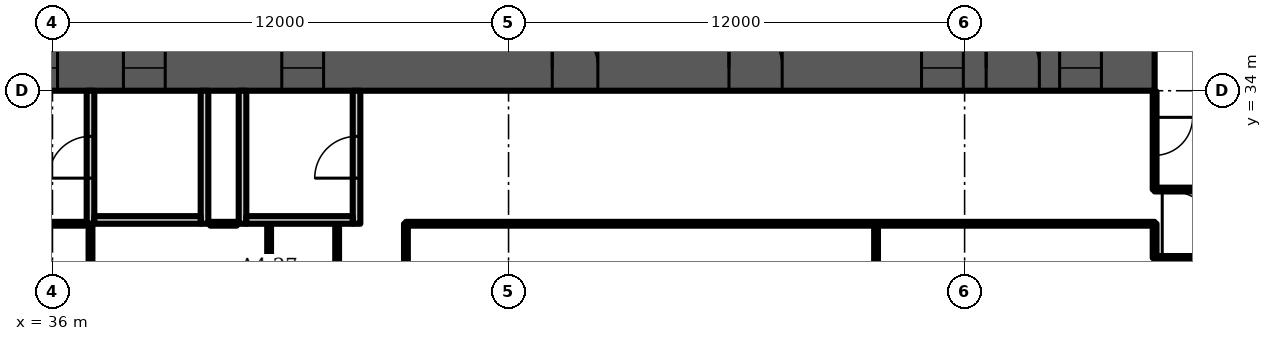
"""IFC4 building model, lengths in metres.
Left out: names, types, materials, properties, quantities, classifications, styles, units other than length and angle.
Written with IfcOpenShell. Run it as: python <this file> out.ifc"""

import sys

from ifc_helpers import new_model, si_unit, direction, frame, frame_2d, origin, place, context, subcontext, project, spatial, rectangle, extrude, element, fill, save


model = new_model("IFC4")
c1 = context("Model", 3, precision=1e-05, world=origin(), true_north=direction((0.0, 1.0)))
c2 = subcontext(c1, "Body", "Model", "MODEL_VIEW")
j1 = project(units=[si_unit("LENGTHUNIT", "METRE"), si_unit("PLANEANGLEUNIT", "RADIAN")], contexts=[c1])
p1 = place(None, origin())
s1 = spatial("IfcSite", under=j1, at=p1, CompositionType="ELEMENT")
p2 = place(p1, origin())
s2 = spatial("IfcBuilding", under=s1, at=p2, CompositionType="ELEMENT")
p3 = place(p2, frame((0.0, 0.0, 73.9)))
s3 = spatial("IfcBuildingStorey", under=s2, at=p3, CompositionType="ELEMENT", Elevation=73.9)
p4 = place(p3, frame((9.0, 34.6, 0.0), z_axis=(0.0, 0.0, 1.0), x_axis=(1.0, 0.0, 0.0)))
e1 = element("IfcWall", 1, at=p4, inside=s3, PredefinedType="SHEAR", context=c2, shape_type="SweptSolid", body=[
    extrude(rectangle(XDim=56.0, YDim=1.2, at=frame_2d((28.0, 0.0))), origin(), (0.0, 0.0, 1.0), 3.6),
])
p5 = place(p4, frame((2.0, 0.0, 0.0)))
e2 = element("IfcOpeningElement", 2, at=p5, cuts=e1, PredefinedType="OPENING", context=c2, shape_type="SweptSolid", body=[
    extrude(rectangle(XDim=1.0, YDim=2.1, at=frame_2d((0.5, 1.05))), frame((0.0, 0.61, 0.0), z_axis=(0.0, -1.0, 0.0), x_axis=(1.0, 0.0, 0.0)), (0.0, 0.0, 1.0), 1.22),
])
p6 = place(p4, frame((4.6, 0.0, 0.0)))
e3 = element("IfcOpeningElement", 3, at=p6, cuts=e1, PredefinedType="OPENING", context=c2, shape_type="SweptSolid", body=[
    extrude(rectangle(XDim=1.0, YDim=2.1, at=frame_2d((0.5, 1.05))), frame((0.0, 0.61, 0.0), z_axis=(0.0, -1.0, 0.0), x_axis=(1.0, 0.0, 0.0)), (0.0, 0.0, 1.0), 1.22),
])
p7 = place(p4, frame((7.867, 0.0, 0.0)))
e4 = element("IfcOpeningElement", 4, at=p7, cuts=e1, PredefinedType="OPENING", context=c2, shape_type="SweptSolid", body=[
    extrude(rectangle(XDim=1.1, YDim=2.1, at=frame_2d((0.55, 1.05))), frame((0.0, 0.61, 0.0), z_axis=(0.0, -1.0, 0.0), x_axis=(1.0, 0.0, 0.0)), (0.0, 0.0, 1.0), 1.22),
])
p8 = place(p4, frame((12.033, 0.0, 0.0)))
e5 = element("IfcOpeningElement", 5, at=p8, cuts=e1, PredefinedType="OPENING", context=c2, shape_type="SweptSolid", body=[
    extrude(rectangle(XDim=1.1, YDim=2.1, at=frame_2d((0.55, 1.05))), frame((0.0, 0.61, 0.0), z_axis=(0.0, -1.0, 0.0), x_axis=(1.0, 0.0, 0.0)), (0.0, 0.0, 1.0), 1.22),
])
p9 = place(p4, frame((9.8, 0.0, 0.0)))
e6 = element("IfcOpeningElement", 6, at=p9, cuts=e1, PredefinedType="OPENING", context=c2, shape_type="SweptSolid", body=[
    extrude(rectangle(XDim=1.4, YDim=2.1, at=frame_2d((0.7, 1.05))), frame((0.0, 0.61, 0.0), z_axis=(0.0, -1.0, 0.0), x_axis=(1.0, 0.0, 0.0)), (0.0, 0.0, 1.0), 1.22),
])
p10 = place(p4, frame((14.65, 0.0, 0.0)))
e7 = element("IfcOpeningElement", 7, at=p10, cuts=e1, PredefinedType="OPENING", context=c2, shape_type="SweptSolid", body=[
    extrude(rectangle(XDim=1.2, YDim=2.1, at=frame_2d((0.6, 1.05))), frame((0.0, 0.61, 0.0), z_axis=(0.0, -1.0, 0.0), x_axis=(1.0, 0.0, 0.0)), (0.0, 0.0, 1.0), 1.22),
])
p11 = place(p4, frame((21.867, 0.0, 0.0)))
e8 = element("IfcOpeningElement", 8, at=p11, cuts=e1, PredefinedType="OPENING", context=c2, shape_type="SweptSolid", body=[
    extrude(rectangle(XDim=1.1, YDim=2.1, at=frame_2d((0.55, 1.05))), frame((0.0, 0.61, 0.0), z_axis=(0.0, -1.0, 0.0), x_axis=(1.0, 0.0, 0.0)), (0.0, 0.0, 1.0), 1.22),
])
p12 = place(p4, frame((26.033, 0.0, 0.0)))
e9 = element("IfcOpeningElement", 9, at=p12, cuts=e1, PredefinedType="OPENING", context=c2, shape_type="SweptSolid", body=[
    extrude(rectangle(XDim=1.1, YDim=2.1, at=frame_2d((0.55, 1.05))), frame((0.0, 0.61, 0.0), z_axis=(0.0, -1.0, 0.0), x_axis=(1.0, 0.0, 0.0)), (0.0, 0.0, 1.0), 1.22),
])
p13 = place(p4, frame((23.8, 0.0, 0.0)))
e10 = element("IfcOpeningElement", 10, at=p13, cuts=e1, PredefinedType="OPENING", context=c2, shape_type="SweptSolid", body=[
    extrude(rectangle(XDim=1.4, YDim=2.1, at=frame_2d((0.7, 1.05))), frame((0.0, 0.61, 0.0), z_axis=(0.0, -1.0, 0.0), x_axis=(1.0, 0.0, 0.0)), (0.0, 0.0, 1.0), 1.22),
])
p14 = place(p4, frame((28.867, 0.0, 0.0)))
e11 = element("IfcOpeningElement", 11, at=p14, cuts=e1, PredefinedType="OPENING", context=c2, shape_type="SweptSolid", body=[
    extrude(rectangle(XDim=1.1, YDim=2.1, at=frame_2d((0.55, 1.05))), frame((0.0, 0.61, 0.0), z_axis=(0.0, -1.0, 0.0), x_axis=(1.0, 0.0, 0.0)), (0.0, 0.0, 1.0), 1.22),
])
p15 = place(p4, frame((33.033, 0.0, 0.0)))
e12 = element("IfcOpeningElement", 12, at=p15, cuts=e1, PredefinedType="OPENING", context=c2, shape_type="SweptSolid", body=[
    extrude(rectangle(XDim=1.1, YDim=2.1, at=frame_2d((0.55, 1.05))), frame((0.0, 0.61, 0.0), z_axis=(0.0, -1.0, 0.0), x_axis=(1.0, 0.0, 0.0)), (0.0, 0.0, 1.0), 1.22),
])
p16 = place(p4, frame((40.15, 0.0, 0.0)))
e13 = element("IfcOpeningElement", 13, at=p16, cuts=e1, PredefinedType="OPENING", context=c2, shape_type="SweptSolid", body=[
    extrude(rectangle(XDim=1.2, YDim=2.1, at=frame_2d((0.6, 1.05))), frame((0.0, 0.61, 0.0), z_axis=(0.0, -1.0, 0.0), x_axis=(1.0, 0.0, 0.0)), (0.0, 0.0, 1.0), 1.22),
])
p17 = place(p4, frame((44.8, 0.0, 0.0)))
e14 = element("IfcOpeningElement", 14, at=p17, cuts=e1, PredefinedType="OPENING", context=c2, shape_type="SweptSolid", body=[
    extrude(rectangle(XDim=1.4, YDim=2.1, at=frame_2d((0.7, 1.05))), frame((0.0, 0.61, 0.0), z_axis=(0.0, -1.0, 0.0), x_axis=(1.0, 0.0, 0.0)), (0.0, 0.0, 1.0), 1.22),
])
p18 = place(p4, frame((49.867, 0.0, 0.0)))
e15 = element("IfcOpeningElement", 15, at=p18, cuts=e1, PredefinedType="OPENING", context=c2, shape_type="SweptSolid", body=[
    extrude(rectangle(XDim=1.1, YDim=2.1, at=frame_2d((0.55, 1.05))), frame((0.0, 0.61, 0.0), z_axis=(0.0, -1.0, 0.0), x_axis=(1.0, 0.0, 0.0)), (0.0, 0.0, 1.0), 1.22),
])
p19 = place(p4, frame((53.5, 0.0, 0.0)))
e16 = element("IfcOpeningElement", 16, at=p19, cuts=e1, PredefinedType="OPENING", context=c2, shape_type="SweptSolid", body=[
    extrude(rectangle(XDim=1.1, YDim=2.1, at=frame_2d((0.55, 1.05))), frame((0.0, 0.61, 0.0), z_axis=(0.0, -1.0, 0.0), x_axis=(1.0, 0.0, 0.0)), (0.0, 0.0, 1.0), 1.22),
])
p20 = place(p4, frame((51.567, 0.0, 0.0)))
e17 = element("IfcOpeningElement", 17, at=p20, cuts=e1, PredefinedType="OPENING", context=c2, shape_type="SweptSolid", body=[
    extrude(rectangle(XDim=1.4, YDim=2.1, at=frame_2d((0.7, 1.05))), frame((0.0, 0.61, 0.0), z_axis=(0.0, -1.0, 0.0), x_axis=(1.0, 0.0, 0.0)), (0.0, 0.0, 1.0), 1.22),
])
p21 = place(p3, frame((37.0, 30.5, 0.0), z_axis=(0.0, 0.0, 1.0), x_axis=(0.0, 1.0, 0.0)))
e18 = element("IfcWall", 18, at=p21, inside=s3, PredefinedType="PARTITIONING", context=c2, shape_type="SweptSolid", body=[
    extrude(rectangle(XDim=3.5, YDim=0.2, at=frame_2d((1.75, 0.0))), origin(), (0.0, 0.0, 1.0), 3.2),
])
p22 = place(p21, frame((1.2, 0.0, 0.0)))
e19 = element("IfcOpeningElement", 19, at=p22, cuts=e18, PredefinedType="OPENING", context=c2, shape_type="SweptSolid", body=[
    extrude(rectangle(XDim=1.1, YDim=2.1, at=frame_2d((0.55, 1.05))), frame((0.0, 0.11, 0.0), z_axis=(0.0, -1.0, 0.0), x_axis=(1.0, 0.0, 0.0)), (0.0, 0.0, 1.0), 0.22),
])
p23 = place(p3, frame((40.0, 30.5, 0.0), z_axis=(0.0, 0.0, 1.0), x_axis=(0.0, 1.0, 0.0)))
e20 = element("IfcWall", 20, at=p23, inside=s3, PredefinedType="PARTITIONING", context=c2, shape_type="SweptSolid", body=[
    extrude(rectangle(XDim=3.5, YDim=0.2, at=frame_2d((1.75, 0.0))), origin(), (0.0, 0.0, 1.0), 3.2),
])
p24 = place(p3, frame((37.1, 30.6, 0.0), z_axis=(0.0, 0.0, 1.0), x_axis=(1.0, 0.0, 0.0)))
e21 = element("IfcWall", 21, at=p24, inside=s3, PredefinedType="PARTITIONING", context=c2, shape_type="SweptSolid", body=[
    extrude(rectangle(XDim=2.8, YDim=0.2, at=frame_2d((1.4, 0.0))), origin(), (0.0, 0.0, 1.0), 3.2),
])
p25 = place(p3, frame((41.0, 30.5, 0.0), z_axis=(0.0, 0.0, 1.0), x_axis=(0.0, 1.0, 0.0)))
e22 = element("IfcWall", 22, at=p25, inside=s3, PredefinedType="PARTITIONING", context=c2, shape_type="SweptSolid", body=[
    extrude(rectangle(XDim=3.5, YDim=0.2, at=frame_2d((1.75, 0.0))), origin(), (0.0, 0.0, 1.0), 3.2),
])
p26 = place(p3, frame((44.0, 30.5, 0.0), z_axis=(0.0, 0.0, 1.0), x_axis=(0.0, 1.0, 0.0)))
e23 = element("IfcWall", 23, at=p26, inside=s3, PredefinedType="PARTITIONING", context=c2, shape_type="SweptSolid", body=[
    extrude(rectangle(XDim=3.5, YDim=0.2, at=frame_2d((1.75, 0.0))), origin(), (0.0, 0.0, 1.0), 3.2),
])
p27 = place(p26, frame((1.2, 0.0, 0.0)))
e24 = element("IfcOpeningElement", 24, at=p27, cuts=e23, PredefinedType="OPENING", context=c2, shape_type="SweptSolid", body=[
    extrude(rectangle(XDim=1.1, YDim=2.1, at=frame_2d((0.55, 1.05))), frame((0.0, 0.11, 0.0), z_axis=(0.0, -1.0, 0.0), x_axis=(1.0, 0.0, 0.0)), (0.0, 0.0, 1.0), 0.22),
])
p28 = place(p3, frame((41.1, 30.6, 0.0), z_axis=(0.0, 0.0, 1.0), x_axis=(1.0, 0.0, 0.0)))
e25 = element("IfcWall", 25, at=p28, inside=s3, PredefinedType="PARTITIONING", context=c2, shape_type="SweptSolid", body=[
    extrude(rectangle(XDim=2.8, YDim=0.2, at=frame_2d((1.4, 0.0))), origin(), (0.0, 0.0, 1.0), 3.2),
])
p29 = place(p3, frame((21.94, 30.5, 0.0), z_axis=(0.0, 0.0, 1.0), x_axis=(1.0, 0.0, 0.0)))
e26 = element("IfcWall", 26, at=p29, inside=s3, PredefinedType="PARTITIONING", context=c2, shape_type="SweptSolid", body=[
    extrude(rectangle(XDim=14.91, YDim=0.1, at=frame_2d((7.455, 0.0))), origin(), (0.0, 0.0, 1.0), 3.2),
])
p30 = place(p29, frame((0.345, 0.0, 0.0)))
e27 = element("IfcOpeningElement", 27, at=p30, cuts=e26, PredefinedType="OPENING", context=c2, shape_type="SweptSolid", body=[
    extrude(rectangle(XDim=1.0, YDim=2.1, at=frame_2d((0.5, 1.05))), frame((0.0, 0.06, 0.0), z_axis=(0.0, -1.0, 0.0), x_axis=(1.0, 0.0, 0.0)), (0.0, 0.0, 1.0), 0.12),
])
p31 = place(p29, frame((8.95, 0.0, 0.0)))
e28 = element("IfcOpeningElement", 28, at=p31, cuts=e26, PredefinedType="OPENING", context=c2, shape_type="SweptSolid", body=[
    extrude(rectangle(XDim=1.8, YDim=2.1, at=frame_2d((0.9, 1.05))), frame((0.0, 0.06, 0.0), z_axis=(0.0, -1.0, 0.0), x_axis=(1.0, 0.0, 0.0)), (0.0, 0.0, 1.0), 0.12),
])
p32 = place(p3, frame((37.0, 13.24, 0.0), z_axis=(0.0, 0.0, 1.0), x_axis=(0.0, 1.0, 0.0)))
e29 = element("IfcWall", 29, at=p32, inside=s3, PredefinedType="PARTITIONING", context=c2, shape_type="SweptSolid", body=[
    extrude(rectangle(XDim=17.26, YDim=0.1, at=frame_2d((8.63, 0.0))), origin(), (0.0, 0.0, 1.0), 3.2),
])
p33 = place(p3, frame((41.7, 13.24, 0.0), z_axis=(0.0, 0.0, 1.0), x_axis=(0.0, 1.0, 0.0)))
e30 = element("IfcWall", 30, at=p33, inside=s3, PredefinedType="PARTITIONING", context=c2, shape_type="SweptSolid", body=[
    extrude(rectangle(XDim=17.25, YDim=0.1, at=frame_2d((8.625, 0.0))), origin(), (0.0, 0.0, 1.0), 3.2),
])
p34 = place(p33, frame((3.046, 0.0, 0.0)))
e31 = element("IfcOpeningElement", 31, at=p34, cuts=e30, PredefinedType="OPENING", context=c2, shape_type="SweptSolid", body=[
    extrude(rectangle(XDim=0.9, YDim=2.1, at=frame_2d((0.45, 1.05))), frame((0.0, 0.06, 0.0), z_axis=(0.0, -1.0, 0.0), x_axis=(1.0, 0.0, 0.0)), (0.0, 0.0, 1.0), 0.12),
])
p35 = place(p33, frame((9.465, 0.0, 0.0)))
e32 = element("IfcOpeningElement", 32, at=p35, cuts=e30, PredefinedType="OPENING", context=c2, shape_type="SweptSolid", body=[
    extrude(rectangle(XDim=0.9, YDim=2.1, at=frame_2d((0.45, 1.05))), frame((0.0, 0.06, 0.0), z_axis=(0.0, -1.0, 0.0), x_axis=(1.0, 0.0, 0.0)), (0.0, 0.0, 1.0), 0.12),
])
p36 = place(p33, frame((14.64, 0.0, 0.0)))
e33 = element("IfcOpeningElement", 33, at=p36, cuts=e30, PredefinedType="OPENING", context=c2, shape_type="SweptSolid", body=[
    extrude(rectangle(XDim=1.0, YDim=2.1, at=frame_2d((0.5, 1.05))), frame((0.0, 0.06, 0.0), z_axis=(0.0, -1.0, 0.0), x_axis=(1.0, 0.0, 0.0)), (0.0, 0.0, 1.0), 0.12),
])
p37 = place(p3, frame((43.49, 13.24, 0.0), z_axis=(0.0, 0.0, 1.0), x_axis=(0.0, 1.0, 0.0)))
e34 = element("IfcWall", 34, at=p37, inside=s3, PredefinedType="PARTITIONING", context=c2, shape_type="SweptSolid", body=[
    extrude(rectangle(XDim=17.25, YDim=0.1, at=frame_2d((8.625, 0.0))), origin(), (0.0, 0.0, 1.0), 3.2),
])
p38 = place(p37, frame((8.139, 0.0, 0.0)))
e35 = element("IfcOpeningElement", 35, at=p38, cuts=e34, PredefinedType="OPENING", context=c2, shape_type="SweptSolid", body=[
    extrude(rectangle(XDim=1.0, YDim=2.1, at=frame_2d((0.5, 1.05))), frame((0.0, 0.06, 0.0), z_axis=(0.0, -1.0, 0.0), x_axis=(1.0, 0.0, 0.0)), (0.0, 0.0, 1.0), 0.12),
])
p39 = place(p3, frame((45.3, -3.943, 0.0), z_axis=(0.0, 0.0, 1.0), x_axis=(0.0, 1.0, 0.0)))
e36 = element("IfcWall", 36, at=p39, inside=s3, PredefinedType="PARTITIONING", context=c2, shape_type="SweptSolid", body=[
    extrude(rectangle(XDim=34.443, YDim=0.1, at=frame_2d((17.222, 0.0))), origin(), (0.0, 0.0, 1.0), 2.58),
])
p40 = place(p39, frame((1.598, 0.0, 0.0)))
e37 = element("IfcOpeningElement", 37, at=p40, cuts=e36, PredefinedType="OPENING", context=c2, shape_type="SweptSolid", body=[
    extrude(rectangle(XDim=1.0, YDim=2.1, at=frame_2d((0.5, 1.05))), frame((0.0, 0.06, 0.0), z_axis=(0.0, -1.0, 0.0), x_axis=(1.0, 0.0, 0.0)), (0.0, 0.0, 1.0), 0.12),
])
p41 = place(p39, frame((5.853, 0.0, 0.0)))
e38 = element("IfcOpeningElement", 38, at=p41, cuts=e36, PredefinedType="OPENING", context=c2, shape_type="SweptSolid", body=[
    extrude(rectangle(XDim=1.0, YDim=2.1, at=frame_2d((0.5, 1.05))), frame((0.0, 0.06, 0.0), z_axis=(0.0, -1.0, 0.0), x_axis=(1.0, 0.0, 0.0)), (0.0, 0.0, 1.0), 0.12),
])
p42 = place(p39, frame((10.173, 0.0, 0.0)))
e39 = element("IfcOpeningElement", 39, at=p42, cuts=e36, PredefinedType="OPENING", context=c2, shape_type="SweptSolid", body=[
    extrude(rectangle(XDim=1.0, YDim=2.1, at=frame_2d((0.5, 1.05))), frame((0.0, 0.06, 0.0), z_axis=(0.0, -1.0, 0.0), x_axis=(1.0, 0.0, 0.0)), (0.0, 0.0, 1.0), 0.12),
])
p43 = place(p39, frame((14.488, 0.0, 0.0)))
e40 = element("IfcOpeningElement", 40, at=p43, cuts=e36, PredefinedType="OPENING", context=c2, shape_type="SweptSolid", body=[
    extrude(rectangle(XDim=1.0, YDim=2.1, at=frame_2d((0.5, 1.05))), frame((0.0, 0.06, 0.0), z_axis=(0.0, -1.0, 0.0), x_axis=(1.0, 0.0, 0.0)), (0.0, 0.0, 1.0), 0.12),
])
p44 = place(p39, frame((31.403, 0.0, 0.0)))
e41 = element("IfcOpeningElement", 41, at=p44, cuts=e36, PredefinedType="OPENING", context=c2, shape_type="SweptSolid", body=[
    extrude(rectangle(XDim=1.0, YDim=2.1, at=frame_2d((0.5, 1.05))), frame((0.0, 0.06, 0.0), z_axis=(0.0, -1.0, 0.0), x_axis=(1.0, 0.0, 0.0)), (0.0, 0.0, 1.0), 0.12),
])
p45 = place(p3, frame((45.3, 30.5, 0.0), z_axis=(0.0, 0.0, 1.0), x_axis=(1.0, 0.0, 0.0)))
e42 = element("IfcWall", 42, at=p45, inside=s3, PredefinedType="PARTITIONING", context=c2, shape_type="SweptSolid", body=[
    extrude(rectangle(XDim=19.7, YDim=0.1, at=frame_2d((9.85, 0.0))), origin(), (0.0, 0.0, 1.0), 3.2),
])
p46 = place(p3, frame((57.67, 13.24, 0.0), z_axis=(0.0, 0.0, 1.0), x_axis=(0.0, 1.0, 0.0)))
e43 = element("IfcWall", 43, at=p46, inside=s3, PredefinedType="PARTITIONING", context=c2, shape_type="SweptSolid", body=[
    extrude(rectangle(XDim=17.26, YDim=0.1, at=frame_2d((8.63, 0.0))), origin(), (0.0, 0.0, 1.0), 3.2),
])
p47 = place(p3, frame((65.0, 29.6, 0.0), z_axis=(0.0, 0.0, 1.0), x_axis=(0.0, 1.0, 0.0)))
e44 = element("IfcWall", 44, at=p47, inside=s3, PredefinedType="PARTITIONING", context=c2, shape_type="SweptSolid", body=[
    extrude(rectangle(XDim=0.9, YDim=0.1, at=frame_2d((0.45, 0.0))), origin(), (0.0, 0.0, 1.0), 3.2),
])
p48 = place(p3, frame((65.0, 29.6, 0.0), z_axis=(0.0, 0.0, 1.0), x_axis=(1.0, 0.0, 0.0)))
e45 = element("IfcWall", 45, at=p48, inside=s3, PredefinedType="PARTITIONING", context=c2, shape_type="SweptSolid", body=[
    extrude(rectangle(XDim=4.425, YDim=0.1, at=frame_2d((2.212, 0.0))), origin(), (0.0, 0.0, 1.0), 3.2),
])
p49 = place(p48, frame((0.2, 0.0, 0.0)))
e46 = element("IfcOpeningElement", 46, at=p49, cuts=e45, PredefinedType="OPENING", context=c2, shape_type="SweptSolid", body=[
    extrude(rectangle(XDim=1.8, YDim=2.1, at=frame_2d((0.9, 1.05))), frame((0.0, 0.06, 0.0), z_axis=(0.0, -1.0, 0.0), x_axis=(1.0, 0.0, 0.0)), (0.0, 0.0, 1.0), 0.12),
])
p50 = place(p3, frame((65.0, 31.4, 0.0), z_axis=(0.0, 0.0, 1.0), x_axis=(0.0, 1.0, 0.0)))
e47 = element("IfcWall", 47, at=p50, inside=s3, PredefinedType="PARTITIONING", context=c2, shape_type="SweptSolid", body=[
    extrude(rectangle(XDim=2.58, YDim=0.1, at=frame_2d((1.29, 0.0))), origin(), (0.0, 0.0, 1.0), 3.2),
])
p51 = place(p50, frame((0.9, 0.0, 0.0)))
e48 = element("IfcOpeningElement", 48, at=p51, cuts=e47, PredefinedType="OPENING", context=c2, shape_type="SweptSolid", body=[
    extrude(rectangle(XDim=1.0, YDim=2.1, at=frame_2d((0.5, 1.05))), frame((0.0, 0.06, 0.0), z_axis=(0.0, -1.0, 0.0), x_axis=(1.0, 0.0, 0.0)), (0.0, 0.0, 1.0), 0.12),
])
p52 = place(p3, frame((65.0, 31.4, 0.0), z_axis=(0.0, 0.0, 1.0), x_axis=(1.0, 0.0, 0.0)))
e49 = element("IfcWall", 49, at=p52, inside=s3, PredefinedType="PARTITIONING", context=c2, shape_type="SweptSolid", body=[
    extrude(rectangle(XDim=7.81, YDim=0.1, at=frame_2d((3.905, 0.0))), origin(), (0.0, 0.0, 1.0), 3.2),
])
p53 = place(p52, frame((6.657, 0.0, 0.0)))
e50 = element("IfcOpeningElement", 50, at=p53, cuts=e49, PredefinedType="OPENING", context=c2, shape_type="SweptSolid", body=[
    extrude(rectangle(XDim=1.0, YDim=2.1, at=frame_2d((0.5, 1.05))), frame((0.0, 0.06, 0.0), z_axis=(0.0, -1.0, 0.0), x_axis=(1.0, 0.0, 0.0)), (0.0, 0.0, 1.0), 0.12),
])
p54 = place(p3, frame((40.15, 30.5, 0.0), z_axis=(0.0, 0.0, 1.0), x_axis=(1.0, 0.0, 0.0)))
e51 = element("IfcWall", 51, at=p54, inside=s3, PredefinedType="PARTITIONING", context=c2, shape_type="SweptSolid", body=[
    extrude(rectangle(XDim=0.7, YDim=0.1, at=frame_2d((0.35, 0.0))), origin(), (0.0, 0.0, 1.0), 3.2),
])
p55 = place(p12, origin())
e52 = element("IfcDoor", 52, at=p55, inside=s3, OperationType="DOUBLE_DOOR_SLIDING", PredefinedType="DOOR", context=c2, shape_type="SweptSolid", body=[
    extrude(rectangle(XDim=1.1, YDim=2.1, at=frame_2d((0.55, 1.05))), frame((0.0, 0.025, 0.0), z_axis=(0.0, -1.0, 0.0), x_axis=(1.0, 0.0, 0.0)), (0.0, 0.0, 1.0), 0.05),
])
fill(e9, e52)
p56 = place(p14, origin())
e53 = element("IfcDoor", 53, at=p56, inside=s3, OperationType="DOUBLE_DOOR_SLIDING", PredefinedType="DOOR", context=c2, shape_type="SweptSolid", body=[
    extrude(rectangle(XDim=1.1, YDim=2.1, at=frame_2d((0.55, 1.05))), frame((0.0, 0.025, 0.0), z_axis=(0.0, -1.0, 0.0), x_axis=(1.0, 0.0, 0.0)), (0.0, 0.0, 1.0), 0.05),
])
fill(e11, e53)
p57 = place(p15, origin())
e54 = element("IfcDoor", 54, at=p57, inside=s3, OperationType="DOUBLE_DOOR_SLIDING", PredefinedType="DOOR", context=c2, shape_type="SweptSolid", body=[
    extrude(rectangle(XDim=1.1, YDim=2.1, at=frame_2d((0.55, 1.05))), frame((0.0, 0.025, 0.0), z_axis=(0.0, -1.0, 0.0), x_axis=(1.0, 0.0, 0.0)), (0.0, 0.0, 1.0), 0.05),
])
fill(e12, e54)
p58 = place(p16, origin())
e55 = element("IfcDoor", 55, at=p58, inside=s3, OperationType="SINGLE_SWING_LEFT", PredefinedType="DOOR", context=c2, shape_type="SweptSolid", body=[
    extrude(rectangle(XDim=1.2, YDim=2.1, at=frame_2d((0.6, 1.05))), frame((0.0, 0.025, 0.0), z_axis=(0.0, -1.0, 0.0), x_axis=(1.0, 0.0, 0.0)), (0.0, 0.0, 1.0), 0.05),
])
fill(e13, e55)
p59 = place(p17, origin())
e56 = element("IfcDoor", 56, at=p59, inside=s3, OperationType="DOUBLE_DOOR_SINGLE_SWING", PredefinedType="DOOR", context=c2, shape_type="SweptSolid", body=[
    extrude(rectangle(XDim=1.4, YDim=2.1, at=frame_2d((0.7, 1.05))), frame((0.0, 0.025, 0.0), z_axis=(0.0, -1.0, 0.0), x_axis=(1.0, 0.0, 0.0)), (0.0, 0.0, 1.0), 0.05),
])
fill(e14, e56)
p60 = place(p18, origin())
e57 = element("IfcDoor", 57, at=p60, inside=s3, OperationType="DOUBLE_DOOR_SLIDING", PredefinedType="DOOR", context=c2, shape_type="SweptSolid", body=[
    extrude(rectangle(XDim=1.1, YDim=2.1, at=frame_2d((0.55, 1.05))), frame((0.0, 0.025, 0.0), z_axis=(0.0, -1.0, 0.0), x_axis=(1.0, 0.0, 0.0)), (0.0, 0.0, 1.0), 0.05),
])
fill(e15, e57)
p61 = place(p19, origin())
e58 = element("IfcDoor", 58, at=p61, inside=s3, OperationType="DOUBLE_DOOR_SLIDING", PredefinedType="DOOR", context=c2, shape_type="SweptSolid", body=[
    extrude(rectangle(XDim=1.1, YDim=2.1, at=frame_2d((0.55, 1.05))), frame((0.0, 0.025, 0.0), z_axis=(0.0, -1.0, 0.0), x_axis=(1.0, 0.0, 0.0)), (0.0, 0.0, 1.0), 0.05),
])
fill(e16, e58)
p62 = place(p20, origin())
e59 = element("IfcDoor", 59, at=p62, inside=s3, OperationType="DOUBLE_DOOR_SINGLE_SWING", PredefinedType="DOOR", context=c2, shape_type="SweptSolid", body=[
    extrude(rectangle(XDim=1.4, YDim=2.1, at=frame_2d((0.7, 1.05))), frame((0.0, 0.025, 0.0), z_axis=(0.0, -1.0, 0.0), x_axis=(1.0, 0.0, 0.0)), (0.0, 0.0, 1.0), 0.05),
])
fill(e17, e59)
p63 = place(p22, origin())
e60 = element("IfcDoor", 60, at=p63, inside=s3, OperationType="SINGLE_SWING_LEFT", PredefinedType="DOOR", context=c2, shape_type="SweptSolid", body=[
    extrude(rectangle(XDim=1.1, YDim=2.1, at=frame_2d((0.55, 1.05))), frame((0.0, 0.025, 0.0), z_axis=(0.0, -1.0, 0.0), x_axis=(1.0, 0.0, 0.0)), (0.0, 0.0, 1.0), 0.05),
])
fill(e19, e60)
p64 = place(p27, origin())
e61 = element("IfcDoor", 61, at=p64, inside=s3, OperationType="SINGLE_SWING_LEFT", PredefinedType="DOOR", context=c2, shape_type="SweptSolid", body=[
    extrude(rectangle(XDim=1.1, YDim=2.1, at=frame_2d((0.55, 1.05))), frame((0.0, 0.025, 0.0), z_axis=(0.0, -1.0, 0.0), x_axis=(1.0, 0.0, 0.0)), (0.0, 0.0, 1.0), 0.05),
])
fill(e24, e61)
p65 = place(p49, origin())
e62 = element("IfcDoor", 62, at=p65, inside=s3, OperationType="DOUBLE_DOOR_SINGLE_SWING", PredefinedType="DOOR", context=c2, shape_type="SweptSolid", body=[
    extrude(rectangle(XDim=1.8, YDim=2.1, at=frame_2d((0.9, 1.05))), frame((0.0, 0.025, 0.0), z_axis=(0.0, -1.0, 0.0), x_axis=(1.0, 0.0, 0.0)), (0.0, 0.0, 1.0), 0.05),
])
fill(e46, e62)
p66 = place(p51, origin())
e63 = element("IfcDoor", 63, at=p66, inside=s3, OperationType="SINGLE_SWING_RIGHT", PredefinedType="DOOR", context=c2, shape_type="SweptSolid", body=[
    extrude(rectangle(XDim=1.0, YDim=2.1, at=frame_2d((0.5, 1.05))), frame((0.0, 0.025, 0.0), z_axis=(0.0, -1.0, 0.0), x_axis=(1.0, 0.0, 0.0)), (0.0, 0.0, 1.0), 0.05),
])
fill(e48, e63)
save(model, sys.argv[1])
